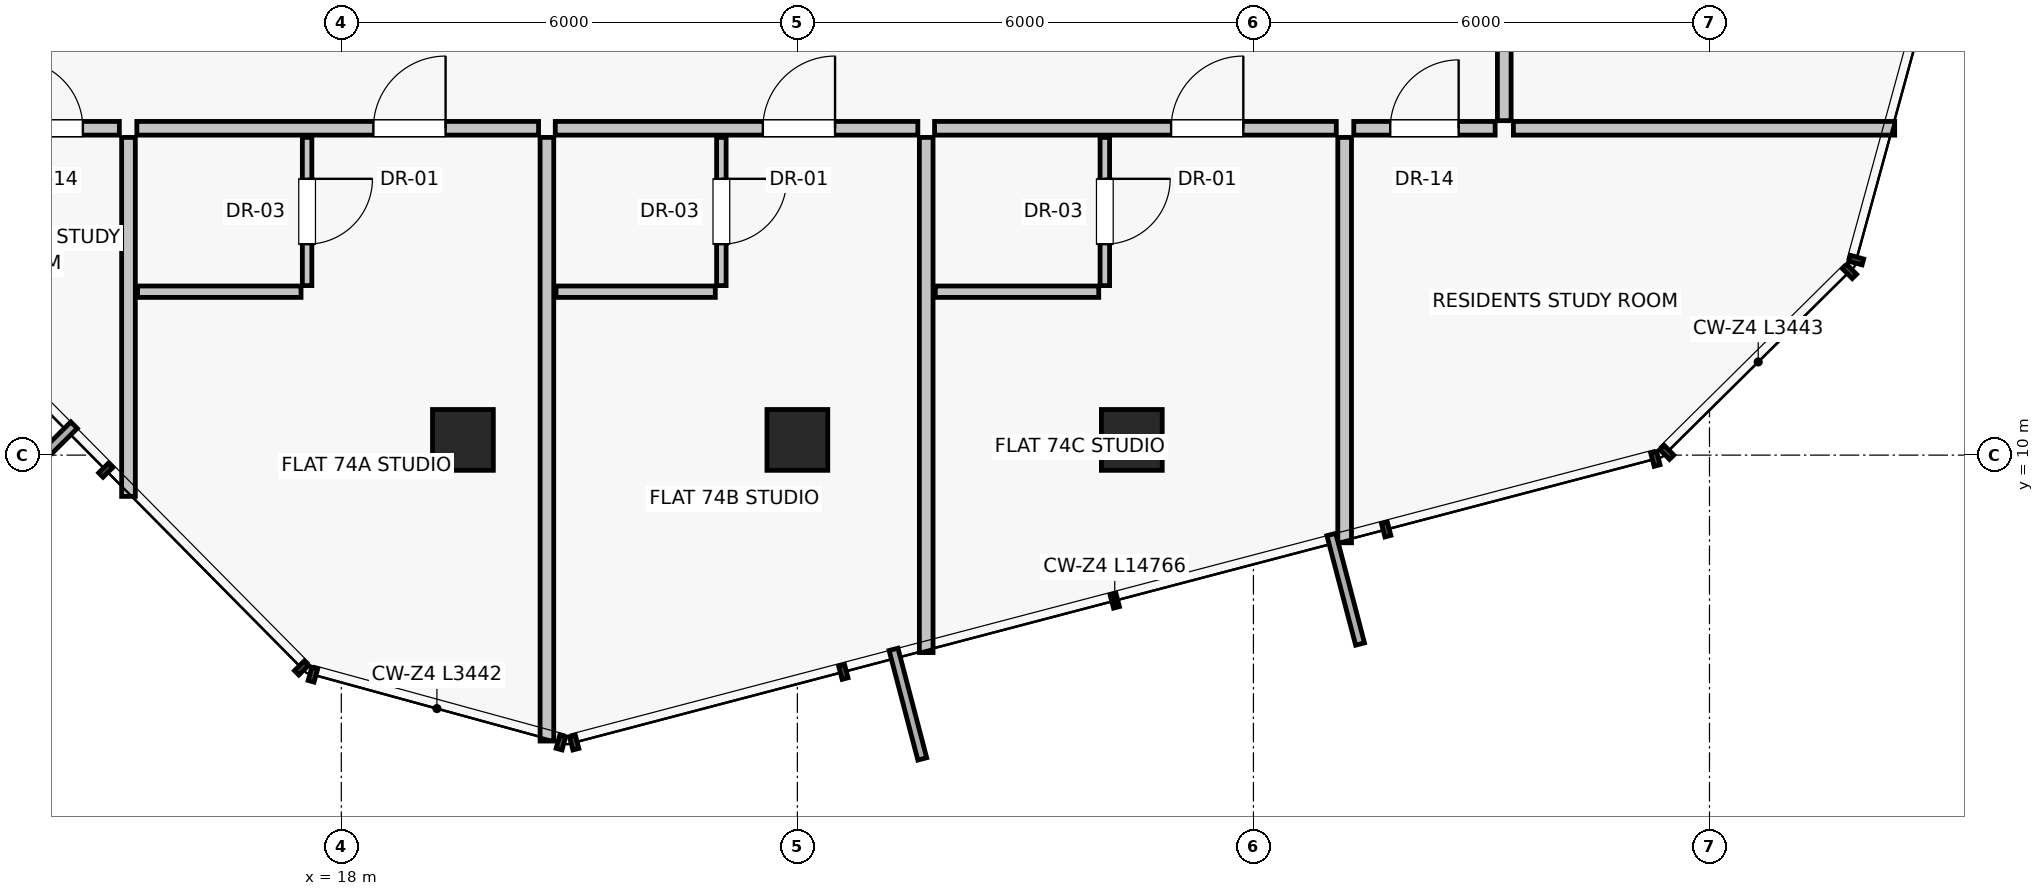
"""IFC4 building model, lengths in metres.
Left out: names, types, materials, properties, quantities, classifications, styles, units other than length and angle.
Written with IfcOpenShell. Run it as: python <this file> out.ifc"""

import sys

from ifc_helpers import new_model, si_unit, direction, frame, frame_2d, origin, origin_2d, place, context, subcontext, project, spatial, rectangle, extrude, source, transform, mapped, element, fill, save


model = new_model("IFC4")
c1 = context("Model", 3, precision=1e-05, world=origin(), true_north=direction((0.0, 1.0)))
c2 = subcontext(c1, "Body", "Model", "MODEL_VIEW")
j1 = project(units=[si_unit("LENGTHUNIT", "METRE"), si_unit("PLANEANGLEUNIT", "RADIAN")], contexts=[c1])
p1 = place(None, origin())
s1 = spatial("IfcSite", under=j1, at=p1, CompositionType="ELEMENT")
p2 = place(p1, origin())
s2 = spatial("IfcBuilding", under=s1, at=p2, CompositionType="ELEMENT")
p3 = place(p2, frame((0.0, 0.0, 261.0)))
s3 = spatial("IfcBuildingStorey", under=s2, at=p3, CompositionType="ELEMENT", Elevation=261.0)
for number, where, z_axis, x_axis in (
    (1, (19.6, 10.2, 0.0), (0.0, 0.0, 1.0), (1.0, 0.0, 0.0)),
    (2, (24.0, 10.2, 0.0), (0.0, 0.0, 1.0), (1.0, 0.0, 0.0)),
    (3, (28.4, 10.2, 0.0), (0.0, 0.0, 1.0), (1.0, 0.0, 0.0)),
):
    element("IfcColumn", number, at=place(p3, frame(where, z_axis=z_axis, x_axis=x_axis)), inside=s3, PredefinedType="COLUMN", context=c2, shape_type="SweptSolid", body=[
        extrude(rectangle(XDim=0.8, YDim=0.8, at=origin_2d()), origin(), (0.0, 0.0, 1.0), 3.25),
    ])
p4 = place(p3, frame((15.2, 14.18, 0.0), z_axis=(0.0, 0.0, 1.0), x_axis=(0.0, -1.0, 0.0)))
e4 = element("IfcWall", 4, at=p4, inside=s3, PredefinedType="PARTITIONING", context=c2, shape_type="SweptSolid", body=[
    extrude(rectangle(XDim=4.723, YDim=0.18, at=frame_2d((2.361, 0.0))), origin(), (0.0, 0.0, 1.0), 2.93),
])
p5 = place(p3, frame((31.2, 14.18, 0.0), z_axis=(0.0, 0.0, 1.0), x_axis=(0.0, -1.0, 0.0)))
e5 = element("IfcWall", 5, at=p5, inside=s3, PredefinedType="PARTITIONING", context=c2, shape_type="SweptSolid", body=[
    extrude(rectangle(XDim=5.333, YDim=0.18, at=frame_2d((2.667, 0.0))), origin(), (0.0, 0.0, 1.0), 2.93),
])
p6 = place(p3, frame((15.31, 14.3, 0.0), z_axis=(0.0, 0.0, 1.0), x_axis=(1.0, 0.0, 0.0)))
e6 = element("IfcWall", 6, at=p6, inside=s3, PredefinedType="PARTITIONING", context=c2, shape_type="SweptSolid", body=[
    extrude(rectangle(XDim=5.285, YDim=0.18, at=frame_2d((2.643, 0.0))), origin(), (0.0, 0.0, 1.0), 2.93),
])
p7 = place(p6, frame((3.112, 0.0, 0.0)))
e7 = element("IfcOpeningElement", 7, at=p7, cuts=e6, PredefinedType="OPENING", context=c2, shape_type="SweptSolid", body=[
    extrude(rectangle(XDim=0.95, YDim=2.02, at=frame_2d((0.475, 1.01))), frame((0.0, 0.1, 0.0), z_axis=(0.0, -1.0, 0.0), x_axis=(1.0, 0.0, 0.0)), (0.0, 0.0, 1.0), 0.2),
])
p8 = place(p3, frame((17.55, 14.18, 0.0), z_axis=(0.0, 0.0, 1.0), x_axis=(0.0, -1.0, 0.0)))
e8 = element("IfcWall", 8, at=p8, inside=s3, PredefinedType="PARTITIONING", context=c2, shape_type="SweptSolid", body=[
    extrude(rectangle(XDim=1.95, YDim=0.125, at=frame_2d((0.975, 0.0))), origin(), (0.0, 0.0, 1.0), 2.93),
])
p9 = place(p8, frame((0.545, 0.0, 0.0)))
e9 = element("IfcOpeningElement", 9, at=p9, cuts=e8, PredefinedType="OPENING", context=c2, shape_type="SweptSolid", body=[
    extrude(rectangle(XDim=0.86, YDim=2.01, at=frame_2d((0.43, 1.005))), frame((0.0, 0.073, 0.0), z_axis=(0.0, -1.0, 0.0), x_axis=(1.0, 0.0, 0.0)), (0.0, 0.0, 1.0), 0.145),
])
p10 = place(p3, frame((15.32, 12.15, 0.0), z_axis=(0.0, 0.0, 1.0), x_axis=(1.0, 0.0, 0.0)))
e10 = element("IfcWall", 10, at=p10, inside=s3, PredefinedType="PARTITIONING", context=c2, shape_type="SweptSolid", body=[
    extrude(rectangle(XDim=2.15, YDim=0.15, at=frame_2d((1.075, 0.0))), origin(), (0.0, 0.0, 1.0), 2.93),
])
p11 = place(p3, frame((20.705, 14.18, 0.0), z_axis=(0.0, 0.0, 1.0), x_axis=(0.0, -1.0, 0.0)))
e11 = element("IfcWall", 11, at=p11, inside=s3, PredefinedType="PARTITIONING", context=c2, shape_type="SweptSolid", body=[
    extrude(rectangle(XDim=7.942, YDim=0.18, at=frame_2d((3.971, 0.0))), origin(), (0.0, 0.0, 1.0), 2.458),
])
p12 = place(p3, frame((20.815, 14.3, 0.0), z_axis=(0.0, 0.0, 1.0), x_axis=(1.0, 0.0, 0.0)))
e12 = element("IfcWall", 12, at=p12, inside=s3, PredefinedType="PARTITIONING", context=c2, shape_type="SweptSolid", body=[
    extrude(rectangle(XDim=4.77, YDim=0.18, at=frame_2d((2.385, 0.0))), origin(), (0.0, 0.0, 1.0), 2.93),
])
p13 = place(p12, frame((2.731, 0.0, 0.0)))
e13 = element("IfcOpeningElement", 13, at=p13, cuts=e12, PredefinedType="OPENING", context=c2, shape_type="SweptSolid", body=[
    extrude(rectangle(XDim=0.95, YDim=2.02, at=frame_2d((0.475, 1.01))), frame((0.0, 0.1, 0.0), z_axis=(0.0, -1.0, 0.0), x_axis=(1.0, 0.0, 0.0)), (0.0, 0.0, 1.0), 0.2),
])
p14 = place(p3, frame((23.0, 14.18, 0.0), z_axis=(0.0, 0.0, 1.0), x_axis=(0.0, -1.0, 0.0)))
e14 = element("IfcWall", 14, at=p14, inside=s3, PredefinedType="PARTITIONING", context=c2, shape_type="SweptSolid", body=[
    extrude(rectangle(XDim=1.95, YDim=0.125, at=frame_2d((0.975, 0.0))), origin(), (0.0, 0.0, 1.0), 2.93),
])
p15 = place(p14, frame((0.545, 0.0, 0.0)))
e15 = element("IfcOpeningElement", 15, at=p15, cuts=e14, PredefinedType="OPENING", context=c2, shape_type="SweptSolid", body=[
    extrude(rectangle(XDim=0.86, YDim=2.01, at=frame_2d((0.43, 1.005))), frame((0.0, 0.073, 0.0), z_axis=(0.0, -1.0, 0.0), x_axis=(1.0, 0.0, 0.0)), (0.0, 0.0, 1.0), 0.145),
])
p16 = place(p3, frame((20.825, 12.15, 0.0), z_axis=(0.0, 0.0, 1.0), x_axis=(1.0, 0.0, 0.0)))
e16 = element("IfcWall", 16, at=p16, inside=s3, PredefinedType="PARTITIONING", context=c2, shape_type="SweptSolid", body=[
    extrude(rectangle(XDim=2.095, YDim=0.15, at=frame_2d((1.047, 0.0))), origin(), (0.0, 0.0, 1.0), 2.93),
])
p17 = place(p3, frame((25.695, 14.18, 0.0), z_axis=(0.0, 0.0, 1.0), x_axis=(0.0, -1.0, 0.0)))
e17 = element("IfcWall", 17, at=p17, inside=s3, PredefinedType="PARTITIONING", context=c2, shape_type="SweptSolid", body=[
    extrude(rectangle(XDim=6.778, YDim=0.18, at=frame_2d((3.389, 0.0))), origin(), (0.0, 0.0, 1.0), 2.93),
])
p18 = place(p3, frame((25.805, 14.3, 0.0), z_axis=(0.0, 0.0, 1.0), x_axis=(1.0, 0.0, 0.0)))
e18 = element("IfcWall", 18, at=p18, inside=s3, PredefinedType="PARTITIONING", context=c2, shape_type="SweptSolid", body=[
    extrude(rectangle(XDim=5.285, YDim=0.18, at=frame_2d((2.643, 0.0))), origin(), (0.0, 0.0, 1.0), 2.93),
])
p19 = place(p18, frame((3.112, 0.0, 0.0)))
e19 = element("IfcOpeningElement", 19, at=p19, cuts=e18, PredefinedType="OPENING", context=c2, shape_type="SweptSolid", body=[
    extrude(rectangle(XDim=0.95, YDim=2.02, at=frame_2d((0.475, 1.01))), frame((0.0, 0.1, 0.0), z_axis=(0.0, -1.0, 0.0), x_axis=(1.0, 0.0, 0.0)), (0.0, 0.0, 1.0), 0.2),
])
p20 = place(p3, frame((28.045, 14.18, 0.0), z_axis=(0.0, 0.0, 1.0), x_axis=(0.0, -1.0, 0.0)))
e20 = element("IfcWall", 20, at=p20, inside=s3, PredefinedType="PARTITIONING", context=c2, shape_type="SweptSolid", body=[
    extrude(rectangle(XDim=1.95, YDim=0.125, at=frame_2d((0.975, 0.0))), origin(), (0.0, 0.0, 1.0), 2.93),
])
p21 = place(p20, frame((0.545, 0.0, 0.0)))
e21 = element("IfcOpeningElement", 21, at=p21, cuts=e20, PredefinedType="OPENING", context=c2, shape_type="SweptSolid", body=[
    extrude(rectangle(XDim=0.86, YDim=2.01, at=frame_2d((0.43, 1.005))), frame((0.0, 0.073, 0.0), z_axis=(0.0, -1.0, 0.0), x_axis=(1.0, 0.0, 0.0)), (0.0, 0.0, 1.0), 0.145),
])
p22 = place(p3, frame((25.815, 12.15, 0.0), z_axis=(0.0, 0.0, 1.0), x_axis=(1.0, 0.0, 0.0)))
e22 = element("IfcWall", 22, at=p22, inside=s3, PredefinedType="PARTITIONING", context=c2, shape_type="SweptSolid", body=[
    extrude(rectangle(XDim=2.15, YDim=0.15, at=frame_2d((1.075, 0.0))), origin(), (0.0, 0.0, 1.0), 2.93),
])
p23 = place(p3, frame((33.3, 14.4, 0.0), z_axis=(0.0, 0.0, 1.0), x_axis=(0.0, 1.0, 0.0)))
e23 = element("IfcWall", 23, at=p23, inside=s3, PredefinedType="PARTITIONING", context=c2, shape_type="SweptSolid", body=[
    extrude(rectangle(XDim=1.9, YDim=0.18, at=frame_2d((0.95, 0.0))), origin(), (0.0, 0.0, 1.0), 2.93),
])
p24 = place(p3, frame((13.22, 14.3, 0.0), z_axis=(0.0, 0.0, 1.0), x_axis=(1.0, 0.0, 0.0)))
e24 = element("IfcWall", 24, at=p24, inside=s3, PredefinedType="PARTITIONING", context=c2, shape_type="SweptSolid", body=[
    extrude(rectangle(XDim=1.86, YDim=0.18, at=frame_2d((0.93, 0.0))), origin(), (0.0, 0.0, 1.0), 2.93),
])
p25 = place(p24, frame((0.48, 0.0, 0.0)))
e25 = element("IfcOpeningElement", 25, at=p25, cuts=e24, PredefinedType="OPENING", context=c2, shape_type="SweptSolid", body=[
    extrude(rectangle(XDim=0.9, YDim=2.01, at=frame_2d((0.45, 1.005))), frame((0.0, 0.1, 0.0), z_axis=(0.0, -1.0, 0.0), x_axis=(1.0, 0.0, 0.0)), (0.0, 0.0, 1.0), 0.2),
])
p26 = place(p3, frame((33.42, 14.3, 0.0), z_axis=(0.0, 0.0, 1.0), x_axis=(1.0, 0.0, 0.0)))
e26 = element("IfcWall", 26, at=p26, inside=s3, PredefinedType="PARTITIONING", context=c2, shape_type="SweptSolid", body=[
    extrude(rectangle(XDim=5.017, YDim=0.18, at=frame_2d((2.508, 0.0))), origin(), (0.0, 0.0, 1.0), 2.93),
])
p27 = place(p3, frame((31.32, 14.3, 0.0), z_axis=(0.0, 0.0, 1.0), x_axis=(1.0, 0.0, 0.0)))
e27 = element("IfcWall", 27, at=p27, inside=s3, PredefinedType="PARTITIONING", context=c2, shape_type="SweptSolid", body=[
    extrude(rectangle(XDim=1.86, YDim=0.18, at=frame_2d((0.93, 0.0))), origin(), (0.0, 0.0, 1.0), 2.93),
])
p28 = place(p27, frame((0.48, 0.0, 0.0)))
e28 = element("IfcOpeningElement", 28, at=p28, cuts=e27, PredefinedType="OPENING", context=c2, shape_type="SweptSolid", body=[
    extrude(rectangle(XDim=0.9, YDim=2.01, at=frame_2d((0.45, 1.005))), frame((0.0, 0.1, 0.0), z_axis=(0.0, -1.0, 0.0), x_axis=(1.0, 0.0, 0.0)), (0.0, 0.0, 1.0), 0.2),
])
m1 = source(origin(), c2, "Body", "SweptSolid", [
    extrude(rectangle(XDim=0.95, YDim=2.02, at=frame_2d((0.475, 1.01))), frame((0.0, 0.025, 0.0), z_axis=(0.0, -1.0, 0.0), x_axis=(1.0, 0.0, 0.0)), (0.0, 0.0, 1.0), 0.05),
])
p29 = place(p7, origin())
e29 = element("IfcDoor", 29, at=p29, inside=s3, OperationType="SINGLE_SWING_RIGHT", PredefinedType="DOOR", context=c2, shape_type="MappedRepresentation", body=[
    mapped(m1, transform((0.0, 0.0, 0.0), scale=1.0)),
])
fill(e7, e29)
m2 = source(origin(), c2, "Body", "SweptSolid", [
    extrude(rectangle(XDim=0.86, YDim=2.01, at=frame_2d((0.43, 1.005))), frame((0.0, 0.025, 0.0), z_axis=(0.0, -1.0, 0.0), x_axis=(1.0, 0.0, 0.0)), (0.0, 0.0, 1.0), 0.05),
])
p30 = place(p9, origin())
e30 = element("IfcDoor", 30, at=p30, inside=s3, OperationType="SINGLE_SWING_LEFT", PredefinedType="DOOR", context=c2, shape_type="MappedRepresentation", body=[
    mapped(m2, transform((0.0, 0.0, 0.0), scale=1.0)),
])
fill(e9, e30)
p31 = place(p13, origin())
e31 = element("IfcDoor", 31, at=p31, inside=s3, OperationType="SINGLE_SWING_RIGHT", PredefinedType="DOOR", context=c2, shape_type="MappedRepresentation", body=[
    mapped(m1, transform((0.0, 0.0, 0.0), scale=1.0)),
])
fill(e13, e31)
p32 = place(p15, origin())
e32 = element("IfcDoor", 32, at=p32, inside=s3, OperationType="SINGLE_SWING_LEFT", PredefinedType="DOOR", context=c2, shape_type="MappedRepresentation", body=[
    mapped(m2, transform((0.0, 0.0, 0.0), scale=1.0)),
])
fill(e15, e32)
p33 = place(p19, origin())
e33 = element("IfcDoor", 33, at=p33, inside=s3, OperationType="SINGLE_SWING_RIGHT", PredefinedType="DOOR", context=c2, shape_type="MappedRepresentation", body=[
    mapped(m1, transform((0.0, 0.0, 0.0), scale=1.0)),
])
fill(e19, e33)
p34 = place(p21, origin())
e34 = element("IfcDoor", 34, at=p34, inside=s3, OperationType="SINGLE_SWING_LEFT", PredefinedType="DOOR", context=c2, shape_type="MappedRepresentation", body=[
    mapped(m2, transform((0.0, 0.0, 0.0), scale=1.0)),
])
fill(e21, e34)
m3 = source(origin(), c2, "Body", "SweptSolid", [
    extrude(rectangle(XDim=0.9, YDim=2.01, at=frame_2d((0.45, 1.005))), frame((0.0, 0.025, 0.0), z_axis=(0.0, -1.0, 0.0), x_axis=(1.0, 0.0, 0.0)), (0.0, 0.0, 1.0), 0.05),
])
p35 = place(p25, origin())
e35 = element("IfcDoor", 35, at=p35, inside=s3, OperationType="SINGLE_SWING_LEFT", PredefinedType="DOOR", context=c2, shape_type="MappedRepresentation", body=[
    mapped(m3, transform((0.0, 0.0, 0.0), scale=1.0)),
])
fill(e25, e35)
p36 = place(p28, origin())
e36 = element("IfcDoor", 36, at=p36, inside=s3, OperationType="SINGLE_SWING_RIGHT", PredefinedType="DOOR", context=c2, shape_type="MappedRepresentation", body=[
    mapped(m3, transform((0.0, 0.0, 0.0), scale=1.0)),
])
fill(e28, e36)
save(model, sys.argv[1])
